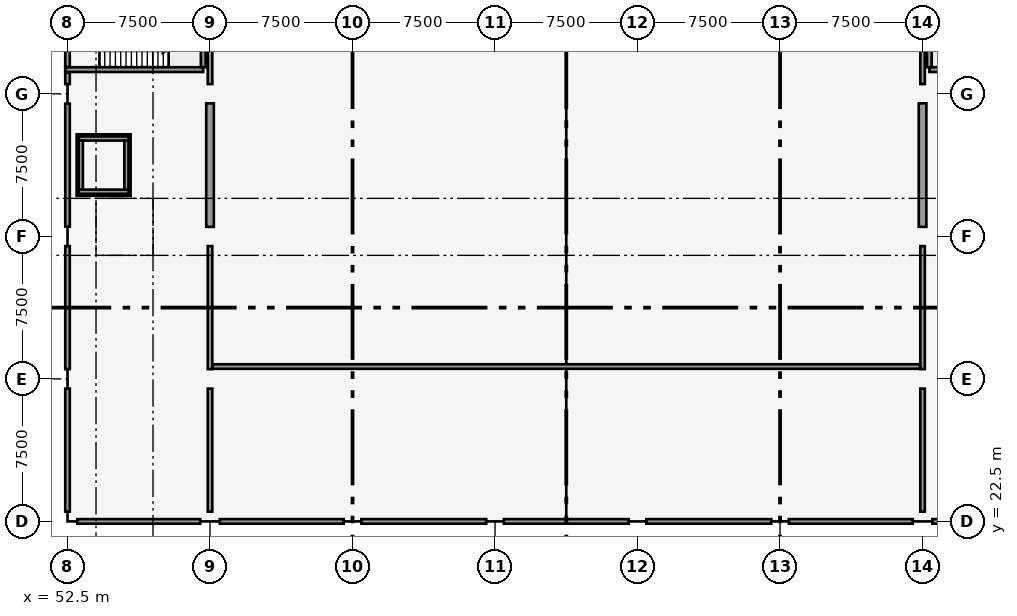
"""IFC4 building model, lengths in metres.
Left out: names, types, materials, properties, quantities, classifications, styles, units other than length and angle.
Written with IfcOpenShell. Run it as: python <this file> out.ifc"""

import sys

from ifc_helpers import new_model, si_unit, direction, frame, frame_2d, origin, origin_2d, place, context, subcontext, project, spatial, rectangle, extrude, element, fill, save


model = new_model("IFC4")
c1 = context("Model", 3, precision=1e-05, world=origin(), true_north=direction((0.0, 1.0)))
c2 = subcontext(c1, "Body", "Model", "MODEL_VIEW")
j1 = project(units=[si_unit("LENGTHUNIT", "METRE"), si_unit("PLANEANGLEUNIT", "RADIAN")], contexts=[c1])
p1 = place(None, origin())
s1 = spatial("IfcSite", under=j1, at=p1, CompositionType="ELEMENT")
p2 = place(p1, origin())
s2 = spatial("IfcBuilding", under=s1, at=p2, CompositionType="ELEMENT")
p3 = place(p2, frame((0.0, 0.0, -4.8)))
s3 = spatial("IfcBuildingStorey", under=s2, at=p3, CompositionType="ELEMENT", Elevation=-4.8)
for number, where, z_axis, x_axis in (
    (1, (52.5, 22.5, 0.0), (0.0, 0.0, 1.0), (1.0, 0.0, 0.0)),
    (2, (52.5, 30.0, 0.0), (0.0, 0.0, 1.0), (1.0, 0.0, 0.0)),
    (3, (52.5, 37.5, 0.0), (0.0, 0.0, 1.0), (1.0, 0.0, 0.0)),
    (4, (52.5, 45.0, 0.0), (0.0, 0.0, 1.0), (1.0, 0.0, 0.0)),
    (5, (60.0, 22.5, 0.0), (0.0, 0.0, 1.0), (1.0, 0.0, 0.0)),
    (6, (60.0, 30.0, 0.0), (0.0, 0.0, 1.0), (1.0, 0.0, 0.0)),
    (7, (60.0, 37.5, 0.0), (0.0, 0.0, 1.0), (1.0, 0.0, 0.0)),
    (8, (60.0, 45.0, 0.0), (0.0, 0.0, 1.0), (1.0, 0.0, 0.0)),
):
    element("IfcColumn", number, at=place(p3, frame(where, z_axis=z_axis, x_axis=x_axis)), inside=s3, PredefinedType="COLUMN", context=c2, shape_type="SweptSolid", body=[
        extrude(rectangle(XDim=1.0, YDim=1.0, at=origin_2d()), origin(), (0.0, 0.0, 1.0), 4.8),
    ])
for number, where, z_axis, x_axis in (
    (9, (67.5, 22.5, 0.0), (0.0, 0.0, 1.0), (1.0, 0.0, 0.0)),
    (10, (67.5, 30.0, 0.0), (0.0, 0.0, 1.0), (1.0, 0.0, 0.0)),
    (11, (75.0, 22.5, 0.0), (0.0, 0.0, 1.0), (1.0, 0.0, 0.0)),
    (12, (75.0, 30.0, 0.0), (0.0, 0.0, 1.0), (1.0, 0.0, 0.0)),
    (13, (75.0, 37.5, 0.0), (0.0, 0.0, 1.0), (1.0, 0.0, 0.0)),
    (14, (75.0, 45.0, 0.0), (0.0, 0.0, 1.0), (1.0, 0.0, 0.0)),
    (15, (82.5, 22.5, 0.0), (0.0, 0.0, 1.0), (1.0, 0.0, 0.0)),
    (16, (82.5, 30.0, 0.0), (0.0, 0.0, 1.0), (1.0, 0.0, 0.0)),
    (17, (90.0, 22.5, 0.0), (0.0, 0.0, 1.0), (1.0, 0.0, 0.0)),
    (18, (90.0, 30.0, 0.0), (0.0, 0.0, 1.0), (1.0, 0.0, 0.0)),
    (19, (90.0, 37.5, 0.0), (0.0, 0.0, 1.0), (1.0, 0.0, 0.0)),
    (20, (90.0, 45.0, 0.0), (0.0, 0.0, 1.0), (1.0, 0.0, 0.0)),
):
    element("IfcColumn", number, at=place(p3, frame(where, z_axis=z_axis, x_axis=x_axis)), inside=s3, PredefinedType="COLUMN", context=c2, shape_type="SweptSolid", body=[
        extrude(rectangle(XDim=0.9, YDim=0.9, at=origin_2d()), origin(), (0.0, 0.0, 1.0), 4.8),
    ])
for number, where, z_axis, x_axis in (
    (21, (97.5, 22.5, 0.0), (0.0, 0.0, 1.0), (1.0, 0.0, 0.0)),
    (22, (97.5, 30.0, 0.0), (0.0, 0.0, 1.0), (1.0, 0.0, 0.0)),
    (23, (97.5, 37.5, 0.0), (0.0, 0.0, 1.0), (1.0, 0.0, 0.0)),
    (24, (97.5, 45.0, 0.0), (0.0, 0.0, 1.0), (1.0, 0.0, 0.0)),
):
    element("IfcColumn", number, at=place(p3, frame(where, z_axis=z_axis, x_axis=x_axis)), inside=s3, PredefinedType="COLUMN", context=c2, shape_type="SweptSolid", body=[
        extrude(rectangle(XDim=1.0, YDim=1.0, at=origin_2d()), origin(), (0.0, 0.0, 1.0), 4.8),
    ])
p4 = place(p3, frame((60.0, 38.0, 0.0), z_axis=(0.0, 0.0, 1.0), x_axis=(0.0, 1.0, 0.0)))
e25 = element("IfcWall", 25, at=p4, inside=s3, PredefinedType="SHEAR", context=c2, shape_type="SweptSolid", body=[
    extrude(rectangle(XDim=6.5, YDim=0.4, at=frame_2d((3.25, 0.0))), origin(), (0.0, 0.0, 1.0), 2.7),
])
p5 = place(p3, frame((97.5, 38.0, 0.0), z_axis=(0.0, 0.0, 1.0), x_axis=(0.0, 1.0, 0.0)))
e26 = element("IfcWall", 26, at=p5, inside=s3, PredefinedType="SHEAR", context=c2, shape_type="SweptSolid", body=[
    extrude(rectangle(XDim=6.5, YDim=0.4, at=frame_2d((3.25, 0.0))), origin(), (0.0, 0.0, 1.0), 3.55),
])
p6 = place(p3, frame((52.38, 46.275, 0.0), z_axis=(0.0, 0.0, 1.0), x_axis=(1.0, 0.0, 0.0)))
e27 = element("IfcWall", 27, at=p6, inside=s3, PredefinedType="SOLIDWALL", context=c2, shape_type="SweptSolid", body=[
    extrude(rectangle(XDim=7.26, YDim=0.25, at=frame_2d((3.63, 0.0))), origin(), (0.0, 0.0, 1.0), 4.5),
])
p7 = place(p6, frame((0.62, 0.0, 0.0)))
e28 = element("IfcOpeningElement", 28, at=p7, cuts=e27, PredefinedType="OPENING", context=c2, shape_type="SweptSolid", body=[
    extrude(rectangle(XDim=1.1, YDim=2.15, at=frame_2d((0.55, 1.075))), frame((0.0, 0.135, 0.0), z_axis=(0.0, -1.0, 0.0), x_axis=(1.0, 0.0, 0.0)), (0.0, 0.0, 1.0), 0.27),
])
p8 = place(p3, frame((59.645, 46.4, 0.0), z_axis=(0.0, 0.0, 1.0), x_axis=(0.0, 1.0, 0.0)))
e29 = element("IfcWall", 29, at=p8, inside=s3, PredefinedType="SOLIDWALL", context=c2, shape_type="SweptSolid", body=[
    extrude(rectangle(XDim=3.56, YDim=0.25, at=frame_2d((1.78, 0.0))), origin(), (0.0, 0.0, 1.0), 4.5),
])
p9 = place(p3, frame((97.86, 46.275, 0.0), z_axis=(0.0, 0.0, 1.0), x_axis=(1.0, 0.0, 0.0)))
e30 = element("IfcWall", 30, at=p9, inside=s3, PredefinedType="SOLIDWALL", context=c2, shape_type="SweptSolid", body=[
    extrude(rectangle(XDim=7.26, YDim=0.25, at=frame_2d((3.63, 0.0))), origin(), (0.0, 0.0, 1.0), 4.5),
])
p10 = place(p9, frame((5.54, 0.0, 0.0)))
e31 = element("IfcOpeningElement", 31, at=p10, cuts=e30, PredefinedType="OPENING", context=c2, shape_type="SweptSolid", body=[
    extrude(rectangle(XDim=1.1, YDim=2.15, at=frame_2d((0.55, 1.075))), frame((0.0, 0.135, 0.0), z_axis=(0.0, -1.0, 0.0), x_axis=(1.0, 0.0, 0.0)), (0.0, 0.0, 1.0), 0.27),
])
p11 = place(p3, frame((97.855, 46.4, 0.0), z_axis=(0.0, 0.0, 1.0), x_axis=(0.0, 1.0, 0.0)))
e32 = element("IfcWall", 32, at=p11, inside=s3, PredefinedType="SOLIDWALL", context=c2, shape_type="SweptSolid", body=[
    extrude(rectangle(XDim=3.56, YDim=0.25, at=frame_2d((1.78, 0.0))), origin(), (0.0, 0.0, 1.0), 4.5),
])
for number, where, z_axis, x_axis in (
    (33, (53.09, 39.85, 0.0), (0.0, 0.0, 1.0), (1.0, 0.0, 0.0)),
    (34, (53.09, 42.65, 0.0), (0.0, 0.0, 1.0), (1.0, 0.0, 0.0)),
):
    element("IfcWall", number, at=place(p3, frame(where, z_axis=z_axis, x_axis=x_axis)), inside=s3, PredefinedType="SOLIDWALL", context=c2, shape_type="SweptSolid", body=[
        extrude(rectangle(XDim=2.62, YDim=0.22, at=frame_2d((1.31, 0.0))), origin(), (0.0, 0.0, 1.0), 4.5),
    ])
p12 = place(p3, frame((53.2, 39.96, 0.0), z_axis=(0.0, 0.0, 1.0), x_axis=(0.0, 1.0, 0.0)))
e35 = element("IfcWall", 35, at=p12, inside=s3, PredefinedType="SOLIDWALL", context=c2, shape_type="SweptSolid", body=[
    extrude(rectangle(XDim=2.58, YDim=0.22, at=frame_2d((1.29, 0.0))), origin(), (0.0, 0.0, 1.0), 4.5),
])
p13 = place(p3, frame((55.6, 39.96, 0.0), z_axis=(0.0, 0.0, 1.0), x_axis=(0.0, 1.0, 0.0)))
e36 = element("IfcWall", 36, at=p13, inside=s3, PredefinedType="SOLIDWALL", context=c2, shape_type="SweptSolid", body=[
    extrude(rectangle(XDim=2.58, YDim=0.22, at=frame_2d((1.29, 0.0))), origin(), (0.0, 0.0, 1.0), 4.5),
])
p14 = place(p13, frame((0.79, 0.0, 0.0)))
e37 = element("IfcOpeningElement", 37, at=p14, cuts=e36, PredefinedType="OPENING", context=c2, shape_type="SweptSolid", body=[
    extrude(rectangle(XDim=1.0, YDim=2.15, at=frame_2d((0.5, 1.075))), frame((0.0, 0.12, 0.0), z_axis=(0.0, -1.0, 0.0), x_axis=(1.0, 0.0, 0.0)), (0.0, 0.0, 1.0), 0.24),
])
p15 = place(p3, frame((53.014, 22.5, 0.0), z_axis=(0.0, 0.0, 1.0), x_axis=(1.0, 0.0, 0.0)))
e38 = element("IfcWall", 38, at=p15, inside=s3, PredefinedType="PARTITIONING", context=c2, shape_type="SweptSolid", body=[
    extrude(rectangle(XDim=6.472, YDim=0.24, at=frame_2d((3.236, 0.0))), origin(), (0.0, 0.0, 1.0), 3.87),
])
p16 = place(p3, frame((60.514, 22.5, 0.0), z_axis=(0.0, 0.0, 1.0), x_axis=(1.0, 0.0, 0.0)))
e39 = element("IfcWall", 39, at=p16, inside=s3, PredefinedType="PARTITIONING", context=c2, shape_type="SweptSolid", body=[
    extrude(rectangle(XDim=6.522, YDim=0.24, at=frame_2d((3.261, 0.0))), origin(), (0.0, 0.0, 1.0), 3.82),
])
for number, where, z_axis, x_axis in (
    (40, (67.964, 22.5, 0.0), (0.0, 0.0, 1.0), (1.0, 0.0, 0.0)),
    (41, (75.464, 22.5, 0.0), (0.0, 0.0, 1.0), (1.0, 0.0, 0.0)),
    (42, (82.964, 22.5, 0.0), (0.0, 0.0, 1.0), (1.0, 0.0, 0.0)),
):
    element("IfcWall", number, at=place(p3, frame(where, z_axis=z_axis, x_axis=x_axis)), inside=s3, PredefinedType="PARTITIONING", context=c2, shape_type="SweptSolid", body=[
        extrude(rectangle(XDim=6.572, YDim=0.24, at=frame_2d((3.286, 0.0))), origin(), (0.0, 0.0, 1.0), 3.82),
    ])
p17 = place(p3, frame((90.464, 22.5, 0.0), z_axis=(0.0, 0.0, 1.0), x_axis=(1.0, 0.0, 0.0)))
e43 = element("IfcWall", 43, at=p17, inside=s3, PredefinedType="PARTITIONING", context=c2, shape_type="SweptSolid", body=[
    extrude(rectangle(XDim=6.522, YDim=0.24, at=frame_2d((3.261, 0.0))), origin(), (0.0, 0.0, 1.0), 3.82),
])
p18 = place(p3, frame((98.014, 22.5, 0.0), z_axis=(0.0, 0.0, 1.0), x_axis=(1.0, 0.0, 0.0)))
e44 = element("IfcWall", 44, at=p18, inside=s3, PredefinedType="PARTITIONING", context=c2, shape_type="SweptSolid", body=[
    extrude(rectangle(XDim=6.472, YDim=0.24, at=frame_2d((3.236, 0.0))), origin(), (0.0, 0.0, 1.0), 3.82),
])
p19 = place(p3, frame((52.5, 23.014, 0.0), z_axis=(0.0, 0.0, 1.0), x_axis=(0.0, 1.0, 0.0)))
e45 = element("IfcWall", 45, at=p19, inside=s3, PredefinedType="PARTITIONING", context=c2, shape_type="SweptSolid", body=[
    extrude(rectangle(XDim=6.472, YDim=0.24, at=frame_2d((3.236, 0.0))), origin(), (0.0, 0.0, 1.0), 3.62),
])
for number, where, z_axis, x_axis in (
    (46, (52.5, 30.514, 0.0), (0.0, 0.0, 1.0), (0.0, 1.0, 0.0)),
    (47, (52.5, 38.014, 0.0), (0.0, 0.0, 1.0), (0.0, 1.0, 0.0)),
):
    element("IfcWall", number, at=place(p3, frame(where, z_axis=z_axis, x_axis=x_axis)), inside=s3, PredefinedType="PARTITIONING", context=c2, shape_type="SweptSolid", body=[
        extrude(rectangle(XDim=6.472, YDim=0.24, at=frame_2d((3.236, 0.0))), origin(), (0.0, 0.0, 1.0), 3.42),
    ])
p20 = place(p3, frame((52.5, 45.514, 0.0), z_axis=(0.0, 0.0, 1.0), x_axis=(0.0, 1.0, 0.0)))
e48 = element("IfcWall", 48, at=p20, inside=s3, PredefinedType="PARTITIONING", context=c2, shape_type="SweptSolid", body=[
    extrude(rectangle(XDim=0.622, YDim=0.24, at=frame_2d((0.311, 0.0))), origin(), (0.0, 0.0, 1.0), 3.42),
])
p21 = place(p3, frame((52.5, 46.414, 0.0), z_axis=(0.0, 0.0, 1.0), x_axis=(0.0, 1.0, 0.0)))
e49 = element("IfcWall", 49, at=p21, inside=s3, PredefinedType="PARTITIONING", context=c2, shape_type="SweptSolid", body=[
    extrude(rectangle(XDim=3.532, YDim=0.24, at=frame_2d((1.766, 0.0))), origin(), (0.0, 0.0, 1.0), 3.87),
])
p22 = place(p3, frame((60.0, 23.014, 0.0), z_axis=(0.0, 0.0, 1.0), x_axis=(0.0, 1.0, 0.0)))
e50 = element("IfcWall", 50, at=p22, inside=s3, PredefinedType="PARTITIONING", context=c2, shape_type="SweptSolid", body=[
    extrude(rectangle(XDim=6.472, YDim=0.24, at=frame_2d((3.236, 0.0))), origin(), (0.0, 0.0, 1.0), 3.62),
])
p23 = place(p22, frame((2.436, 0.0, 0.0)))
e51 = element("IfcOpeningElement", 51, at=p23, cuts=e50, PredefinedType="OPENING", context=c2, shape_type="SweptSolid", body=[
    extrude(rectangle(XDim=1.6, YDim=2.15, at=frame_2d((0.8, 1.075))), frame((0.0, 0.13, 0.0), z_axis=(0.0, -1.0, 0.0), x_axis=(1.0, 0.0, 0.0)), (0.0, 0.0, 1.0), 0.26),
])
p24 = place(p3, frame((60.0, 30.514, 0.0), z_axis=(0.0, 0.0, 1.0), x_axis=(0.0, 1.0, 0.0)))
e52 = element("IfcWall", 52, at=p24, inside=s3, PredefinedType="PARTITIONING", context=c2, shape_type="SweptSolid", body=[
    extrude(rectangle(XDim=6.472, YDim=0.24, at=frame_2d((3.236, 0.0))), origin(), (0.0, 0.0, 1.0), 2.67),
])
p25 = place(p24, frame((2.436, 0.0, 0.0)))
e53 = element("IfcOpeningElement", 53, at=p25, cuts=e52, PredefinedType="OPENING", context=c2, shape_type="SweptSolid", body=[
    extrude(rectangle(XDim=1.6, YDim=2.15, at=frame_2d((0.8, 1.075))), frame((0.0, 0.13, 0.0), z_axis=(0.0, -1.0, 0.0), x_axis=(1.0, 0.0, 0.0)), (0.0, 0.0, 1.0), 0.26),
])
p26 = place(p3, frame((60.0, 45.514, 0.0), z_axis=(0.0, 0.0, 1.0), x_axis=(0.0, 1.0, 0.0)))
e54 = element("IfcWall", 54, at=p26, inside=s3, PredefinedType="PARTITIONING", context=c2, shape_type="SweptSolid", body=[
    extrude(rectangle(XDim=6.472, YDim=0.24, at=frame_2d((3.236, 0.0))), origin(), (0.0, 0.0, 1.0), 2.67),
])
p27 = place(p3, frame((97.5, 23.014, 0.0), z_axis=(0.0, 0.0, 1.0), x_axis=(0.0, 1.0, 0.0)))
e55 = element("IfcWall", 55, at=p27, inside=s3, PredefinedType="PARTITIONING", context=c2, shape_type="SweptSolid", body=[
    extrude(rectangle(XDim=6.472, YDim=0.24, at=frame_2d((3.236, 0.0))), origin(), (0.0, 0.0, 1.0), 3.52),
])
p28 = place(p27, frame((2.436, 0.0, 0.0)))
e56 = element("IfcOpeningElement", 56, at=p28, cuts=e55, PredefinedType="OPENING", context=c2, shape_type="SweptSolid", body=[
    extrude(rectangle(XDim=1.6, YDim=2.15, at=frame_2d((0.8, 1.075))), frame((0.0, 0.13, 0.0), z_axis=(0.0, -1.0, 0.0), x_axis=(1.0, 0.0, 0.0)), (0.0, 0.0, 1.0), 0.26),
])
p29 = place(p3, frame((97.5, 30.514, 0.0), z_axis=(0.0, 0.0, 1.0), x_axis=(0.0, 1.0, 0.0)))
e57 = element("IfcWall", 57, at=p29, inside=s3, PredefinedType="PARTITIONING", context=c2, shape_type="SweptSolid", body=[
    extrude(rectangle(XDim=6.472, YDim=0.24, at=frame_2d((3.236, 0.0))), origin(), (0.0, 0.0, 1.0), 3.52),
])
p30 = place(p29, frame((2.436, 0.0, 0.0)))
e58 = element("IfcOpeningElement", 58, at=p30, cuts=e57, PredefinedType="OPENING", context=c2, shape_type="SweptSolid", body=[
    extrude(rectangle(XDim=1.6, YDim=2.15, at=frame_2d((0.8, 1.075))), frame((0.0, 0.13, 0.0), z_axis=(0.0, -1.0, 0.0), x_axis=(1.0, 0.0, 0.0)), (0.0, 0.0, 1.0), 0.26),
])
p31 = place(p3, frame((97.5, 45.514, 0.0), z_axis=(0.0, 0.0, 1.0), x_axis=(0.0, 1.0, 0.0)))
e59 = element("IfcWall", 59, at=p31, inside=s3, PredefinedType="PARTITIONING", context=c2, shape_type="SweptSolid", body=[
    extrude(rectangle(XDim=6.472, YDim=0.24, at=frame_2d((3.236, 0.0))), origin(), (0.0, 0.0, 1.0), 3.52),
])
p32 = place(p3, frame((60.134, 30.65, 0.0), z_axis=(0.0, 0.0, 1.0), x_axis=(1.0, 0.0, 0.0)))
e60 = element("IfcWall", 60, at=p32, inside=s3, PredefinedType="PARTITIONING", context=c2, shape_type="SweptSolid", body=[
    extrude(rectangle(XDim=37.232, YDim=0.24, at=frame_2d((18.616, 0.0))), origin(), (0.0, 0.0, 1.0), 3.42),
])
p33 = place(p7, origin())
e61 = element("IfcDoor", 61, at=p33, inside=s3, OperationType="SINGLE_SWING_LEFT", PredefinedType="DOOR", context=c2, shape_type="SweptSolid", body=[
    extrude(rectangle(XDim=1.1, YDim=2.15, at=frame_2d((0.55, 1.075))), frame((0.0, 0.025, 0.0), z_axis=(0.0, -1.0, 0.0), x_axis=(1.0, 0.0, 0.0)), (0.0, 0.0, 1.0), 0.05),
])
fill(e28, e61)
p34 = place(p14, origin())
e62 = element("IfcDoor", 62, at=p34, inside=s3, OperationType="SLIDING_TO_LEFT", PredefinedType="DOOR", context=c2, shape_type="SweptSolid", body=[
    extrude(rectangle(XDim=1.0, YDim=2.15, at=frame_2d((0.5, 1.075))), frame((0.0, 0.025, 0.0), z_axis=(0.0, -1.0, 0.0), x_axis=(1.0, 0.0, 0.0)), (0.0, 0.0, 1.0), 0.05),
])
fill(e37, e62)
p35 = place(p23, origin())
e63 = element("IfcDoor", 63, at=p35, inside=s3, OperationType="SINGLE_SWING_RIGHT", PredefinedType="DOOR", context=c2, shape_type="SweptSolid", body=[
    extrude(rectangle(XDim=1.6, YDim=2.15, at=frame_2d((0.8, 1.075))), frame((0.0, 0.025, 0.0), z_axis=(0.0, -1.0, 0.0), x_axis=(1.0, 0.0, 0.0)), (0.0, 0.0, 1.0), 0.05),
])
fill(e51, e63)
p36 = place(p25, origin())
e64 = element("IfcDoor", 64, at=p36, inside=s3, OperationType="SINGLE_SWING_LEFT", PredefinedType="DOOR", context=c2, shape_type="SweptSolid", body=[
    extrude(rectangle(XDim=1.6, YDim=2.15, at=frame_2d((0.8, 1.075))), frame((0.0, 0.025, 0.0), z_axis=(0.0, -1.0, 0.0), x_axis=(1.0, 0.0, 0.0)), (0.0, 0.0, 1.0), 0.05),
])
fill(e53, e64)
p37 = place(p28, origin())
e65 = element("IfcDoor", 65, at=p37, inside=s3, OperationType="SINGLE_SWING_RIGHT", PredefinedType="DOOR", context=c2, shape_type="SweptSolid", body=[
    extrude(rectangle(XDim=1.6, YDim=2.15, at=frame_2d((0.8, 1.075))), frame((0.0, 0.025, 0.0), z_axis=(0.0, -1.0, 0.0), x_axis=(1.0, 0.0, 0.0)), (0.0, 0.0, 1.0), 0.05),
])
fill(e56, e65)
p38 = place(p30, origin())
e66 = element("IfcDoor", 66, at=p38, inside=s3, OperationType="SINGLE_SWING_LEFT", PredefinedType="DOOR", context=c2, shape_type="SweptSolid", body=[
    extrude(rectangle(XDim=1.6, YDim=2.15, at=frame_2d((0.8, 1.075))), frame((0.0, 0.025, 0.0), z_axis=(0.0, -1.0, 0.0), x_axis=(1.0, 0.0, 0.0)), (0.0, 0.0, 1.0), 0.05),
])
fill(e58, e66)
save(model, sys.argv[1])
